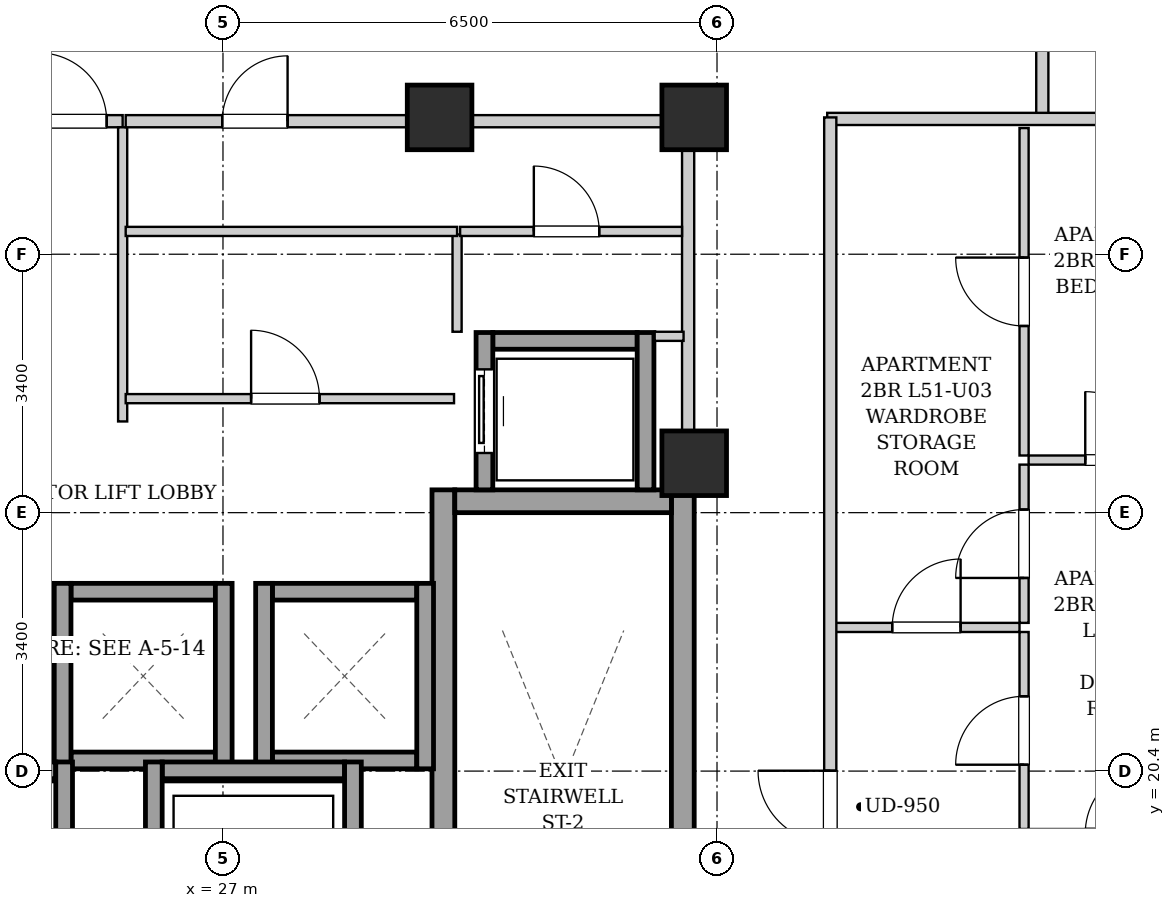
"""IFC4 building model, lengths in metres.
Left out: names, types, materials, properties, quantities, classifications, styles, units other than length and angle.
Written with IfcOpenShell. Run it as: python <this file> out.ifc"""

import sys

from ifc_helpers import new_model, si_unit, direction, frame, frame_2d, origin, origin_2d, place, context, subcontext, project, spatial, rectangle, extrude, element, fill, save


model = new_model("IFC4")
c1 = context("Model", 3, precision=1e-05, world=origin(), true_north=direction((0.0, 1.0)))
c2 = subcontext(c1, "Body", "Model", "MODEL_VIEW")
j1 = project(units=[si_unit("LENGTHUNIT", "METRE"), si_unit("PLANEANGLEUNIT", "RADIAN")], contexts=[c1])
p1 = place(None, origin())
s1 = spatial("IfcSite", under=j1, at=p1, CompositionType="ELEMENT")
p2 = place(p1, origin())
s2 = spatial("IfcBuilding", under=s1, at=p2, CompositionType="ELEMENT")
p3 = place(p2, frame((0.0, 0.0, 177.7)))
s3 = spatial("IfcBuildingStorey", under=s2, at=p3, CompositionType="ELEMENT", Elevation=177.7)
for number, where, z_axis, x_axis in (
    (1, (29.85, 29.0, 0.0), (0.0, 0.0, 1.0), (1.0, 0.0, 0.0)),
    (2, (33.2, 29.0, 0.0), (0.0, 0.0, 1.0), (1.0, 0.0, 0.0)),
    (3, (33.2, 24.45, 0.0), (0.0, 0.0, 1.0), (1.0, 0.0, 0.0)),
):
    element("IfcColumn", number, at=place(p3, frame(where, z_axis=z_axis, x_axis=x_axis)), inside=s3, PredefinedType="COLUMN", context=c2, shape_type="SweptSolid", body=[
        extrude(rectangle(XDim=0.85, YDim=0.85, at=origin_2d()), origin(), (0.0, 0.0, 1.0), 3.3),
    ])
for number, where, z_axis, x_axis in (
    (4, (29.9, 15.1, 0.0), (0.0, 0.0, 1.0), (0.0, 1.0, 0.0)),
    (5, (33.05, 15.1, 0.0), (0.0, 0.0, 1.0), (0.0, 1.0, 0.0)),
):
    element("IfcWall", number, at=place(p3, frame(where, z_axis=z_axis, x_axis=x_axis)), inside=s3, PredefinedType="SHEAR", context=c2, shape_type="SweptSolid", body=[
        extrude(rectangle(XDim=9.0, YDim=0.3, at=frame_2d((4.5, 0.0))), origin(), (0.0, 0.0, 1.0), 3.04),
    ])
p4 = place(p3, frame((30.05, 23.95, 0.0), z_axis=(0.0, 0.0, 1.0), x_axis=(1.0, 0.0, 0.0)))
e6 = element("IfcWall", 6, at=p4, inside=s3, PredefinedType="SHEAR", context=c2, shape_type="SweptSolid", body=[
    extrude(rectangle(XDim=2.85, YDim=0.3, at=frame_2d((1.425, 0.0))), origin(), (0.0, 0.0, 1.0), 3.04),
])
for number, where, z_axis, x_axis in (
    (7, (25.0, 20.54, 0.0), (0.0, 0.0, 1.0), (1.0, 0.0, 0.0)),
    (8, (25.0, 22.76, 0.0), (0.0, 0.0, 1.0), (1.0, 0.0, 0.0)),
):
    element("IfcWall", number, at=place(p3, frame(where, z_axis=z_axis, x_axis=x_axis)), inside=s3, PredefinedType="SHEAR", context=c2, shape_type="SweptSolid", body=[
        extrude(rectangle(XDim=1.9, YDim=0.22, at=frame_2d((0.95, 0.0))), origin(), (0.0, 0.0, 1.0), 3.04),
    ])
for number, where, z_axis, x_axis in (
    (9, (24.89, 20.43, 0.0), (0.0, 0.0, 1.0), (0.0, 1.0, 0.0)),
    (10, (27.01, 20.43, 0.0), (0.0, 0.0, 1.0), (0.0, 1.0, 0.0)),
):
    element("IfcWall", number, at=place(p3, frame(where, z_axis=z_axis, x_axis=x_axis)), inside=s3, PredefinedType="SHEAR", context=c2, shape_type="SweptSolid", body=[
        extrude(rectangle(XDim=2.44, YDim=0.22, at=frame_2d((1.22, 0.0))), origin(), (0.0, 0.0, 1.0), 3.04),
    ])
for number, where, z_axis, x_axis in (
    (11, (27.65, 20.54, 0.0), (0.0, 0.0, 1.0), (1.0, 0.0, 0.0)),
    (12, (27.65, 22.76, 0.0), (0.0, 0.0, 1.0), (1.0, 0.0, 0.0)),
):
    element("IfcWall", number, at=place(p3, frame(where, z_axis=z_axis, x_axis=x_axis)), inside=s3, PredefinedType="SHEAR", context=c2, shape_type="SweptSolid", body=[
        extrude(rectangle(XDim=1.9, YDim=0.22, at=frame_2d((0.95, 0.0))), origin(), (0.0, 0.0, 1.0), 3.04),
    ])
for number, where, z_axis, x_axis in (
    (13, (27.54, 20.43, 0.0), (0.0, 0.0, 1.0), (0.0, 1.0, 0.0)),
    (14, (29.66, 20.43, 0.0), (0.0, 0.0, 1.0), (0.0, 1.0, 0.0)),
):
    element("IfcWall", number, at=place(p3, frame(where, z_axis=z_axis, x_axis=x_axis)), inside=s3, PredefinedType="SHEAR", context=c2, shape_type="SweptSolid", body=[
        extrude(rectangle(XDim=2.44, YDim=0.22, at=frame_2d((1.22, 0.0))), origin(), (0.0, 0.0, 1.0), 3.04),
    ])
p5 = place(p3, frame((30.55, 26.06, 0.0), z_axis=(0.0, 0.0, 1.0), x_axis=(1.0, 0.0, 0.0)))
e15 = element("IfcWall", 15, at=p5, inside=s3, PredefinedType="SHEAR", context=c2, shape_type="SweptSolid", body=[
    extrude(rectangle(XDim=1.9, YDim=0.22, at=frame_2d((0.95, 0.0))), origin(), (0.0, 0.0, 1.0), 3.04),
])
p6 = place(p3, frame((30.44, 24.1, 0.0), z_axis=(0.0, 0.0, 1.0), x_axis=(0.0, 1.0, 0.0)))
e16 = element("IfcWall", 16, at=p6, inside=s3, PredefinedType="SHEAR", context=c2, shape_type="SweptSolid", body=[
    extrude(rectangle(XDim=2.07, YDim=0.22, at=frame_2d((1.035, 0.0))), origin(), (0.0, 0.0, 1.0), 3.04),
])
p7 = place(p6, frame((0.485, 0.0, 0.0)))
e17 = element("IfcOpeningElement", 17, at=p7, cuts=e16, PredefinedType="OPENING", context=c2, shape_type="SweptSolid", body=[
    extrude(rectangle(XDim=1.1, YDim=2.15, at=frame_2d((0.55, 1.075))), frame((0.0, 0.12, 0.0), z_axis=(0.0, -1.0, 0.0), x_axis=(1.0, 0.0, 0.0)), (0.0, 0.0, 1.0), 0.24),
])
p8 = place(p3, frame((32.56, 24.1, 0.0), z_axis=(0.0, 0.0, 1.0), x_axis=(0.0, 1.0, 0.0)))
e18 = element("IfcWall", 18, at=p8, inside=s3, PredefinedType="SHEAR", context=c2, shape_type="SweptSolid", body=[
    extrude(rectangle(XDim=2.07, YDim=0.22, at=frame_2d((1.035, 0.0))), origin(), (0.0, 0.0, 1.0), 3.04),
])
p9 = place(p3, frame((22.4, 20.41, 0.0), z_axis=(0.0, 0.0, 1.0), x_axis=(1.0, 0.0, 0.0)))
e19 = element("IfcWall", 19, at=p9, inside=s3, PredefinedType="SHEAR", context=c2, shape_type="SweptSolid", body=[
    extrude(rectangle(XDim=2.4, YDim=0.22, at=frame_2d((1.2, 0.0))), origin(), (0.0, 0.0, 1.0), 3.04),
])
p10 = place(p3, frame((24.91, 17.98, 0.0), z_axis=(0.0, 0.0, 1.0), x_axis=(0.0, 1.0, 0.0)))
e20 = element("IfcWall", 20, at=p10, inside=s3, PredefinedType="SHEAR", context=c2, shape_type="SweptSolid", body=[
    extrude(rectangle(XDim=2.54, YDim=0.22, at=frame_2d((1.27, 0.0))), origin(), (0.0, 0.0, 1.0), 3.04),
])
p11 = place(p3, frame((26.2, 20.41, 0.0), z_axis=(0.0, 0.0, 1.0), x_axis=(1.0, 0.0, 0.0)))
e21 = element("IfcWall", 21, at=p11, inside=s3, PredefinedType="SHEAR", context=c2, shape_type="SweptSolid", body=[
    extrude(rectangle(XDim=2.4, YDim=0.22, at=frame_2d((1.2, 0.0))), origin(), (0.0, 0.0, 1.0), 3.04),
])
for number, where, z_axis, x_axis in (
    (22, (26.09, 17.98, 0.0), (0.0, 0.0, 1.0), (0.0, 1.0, 0.0)),
    (23, (28.71, 17.98, 0.0), (0.0, 0.0, 1.0), (0.0, 1.0, 0.0)),
):
    element("IfcWall", number, at=place(p3, frame(where, z_axis=z_axis, x_axis=x_axis)), inside=s3, PredefinedType="SHEAR", context=c2, shape_type="SweptSolid", body=[
        extrude(rectangle(XDim=2.54, YDim=0.22, at=frame_2d((1.27, 0.0))), origin(), (0.0, 0.0, 1.0), 3.04),
    ])
p12 = place(p3, frame((33.12, 24.12, 0.0), z_axis=(0.0, 0.0, 1.0), x_axis=(0.0, 1.0, 0.0)))
e24 = element("IfcWall", 24, at=p12, inside=s3, PredefinedType="PARTITIONING", context=c2, shape_type="SweptSolid", body=[
    extrude(rectangle(XDim=4.76, YDim=0.16, at=frame_2d((2.38, 0.0))), origin(), (0.0, 0.0, 1.0), 2.375),
])
p13 = place(p3, frame((24.36, 28.95, 0.0), z_axis=(0.0, 0.0, 1.0), x_axis=(1.0, 0.0, 0.0)))
e25 = element("IfcWall", 25, at=p13, inside=s3, PredefinedType="PARTITIONING", context=c2, shape_type="SweptSolid", body=[
    extrude(rectangle(XDim=1.32, YDim=0.16, at=frame_2d((0.66, 0.0))), origin(), (0.0, 0.0, 1.0), 2.556),
])
p14 = place(p13, frame((0.21, 0.0, 0.0)))
e26 = element("IfcOpeningElement", 26, at=p14, cuts=e25, PredefinedType="OPENING", context=c2, shape_type="SweptSolid", body=[
    extrude(rectangle(XDim=0.9, YDim=2.05, at=frame_2d((0.45, 1.025))), frame((0.0, 0.09, 0.0), z_axis=(0.0, -1.0, 0.0), x_axis=(1.0, 0.0, 0.0)), (0.0, 0.0, 1.0), 0.18),
])
p15 = place(p3, frame((25.68, 25.0, 0.0), z_axis=(0.0, 0.0, 1.0), x_axis=(0.0, 1.0, 0.0)))
e27 = element("IfcWall", 27, at=p15, inside=s3, PredefinedType="PARTITIONING", context=c2, shape_type="SweptSolid", body=[
    extrude(rectangle(XDim=3.87, YDim=0.12, at=frame_2d((1.935, 0.0))), origin(), (0.0, 0.0, 1.0), 3.04),
])
p16 = place(p3, frame((30.08, 26.18, 0.0), z_axis=(0.0, 0.0, 1.0), x_axis=(0.0, 1.0, 0.0)))
e28 = element("IfcWall", 28, at=p16, inside=s3, PredefinedType="PARTITIONING", context=c2, shape_type="SweptSolid", body=[
    extrude(rectangle(XDim=1.28, YDim=0.12, at=frame_2d((0.64, 0.0))), origin(), (0.0, 0.0, 1.0), 3.04),
])
p17 = place(p3, frame((32.68, 26.12, 0.0), z_axis=(0.0, 0.0, 1.0), x_axis=(1.0, 0.0, 0.0)))
e29 = element("IfcWall", 29, at=p17, inside=s3, PredefinedType="PARTITIONING", context=c2, shape_type="SweptSolid", body=[
    extrude(rectangle(XDim=0.38, YDim=0.12, at=frame_2d((0.19, 0.0))), origin(), (0.0, 0.0, 1.0), 3.04),
])
p18 = place(p3, frame((30.12, 27.5, 0.0), z_axis=(0.0, 0.0, 1.0), x_axis=(1.0, 0.0, 0.0)))
e30 = element("IfcWall", 30, at=p18, inside=s3, PredefinedType="PARTITIONING", context=c2, shape_type="SweptSolid", body=[
    extrude(rectangle(XDim=2.92, YDim=0.12, at=frame_2d((1.46, 0.0))), origin(), (0.0, 0.0, 1.0), 3.04),
])
p19 = place(p18, frame((0.97, 0.0, 0.0)))
e31 = element("IfcOpeningElement", 31, at=p19, cuts=e30, PredefinedType="OPENING", context=c2, shape_type="SweptSolid", body=[
    extrude(rectangle(XDim=0.86, YDim=2.05, at=frame_2d((0.43, 1.025))), frame((0.0, 0.07, 0.0), z_axis=(0.0, -1.0, 0.0), x_axis=(1.0, 0.0, 0.0)), (0.0, 0.0, 1.0), 0.14),
])
p20 = place(p3, frame((25.72, 27.5, 0.0), z_axis=(0.0, 0.0, 1.0), x_axis=(1.0, 0.0, 0.0)))
e32 = element("IfcWall", 32, at=p20, inside=s3, PredefinedType="PARTITIONING", context=c2, shape_type="SweptSolid", body=[
    extrude(rectangle(XDim=4.36, YDim=0.12, at=frame_2d((2.18, 0.0))), origin(), (0.0, 0.0, 1.0), 3.04),
])
p21 = place(p3, frame((25.72, 25.3, 0.0), z_axis=(0.0, 0.0, 1.0), x_axis=(1.0, 0.0, 0.0)))
e33 = element("IfcWall", 33, at=p21, inside=s3, PredefinedType="PARTITIONING", context=c2, shape_type="SweptSolid", body=[
    extrude(rectangle(XDim=4.32, YDim=0.12, at=frame_2d((2.16, 0.0))), origin(), (0.0, 0.0, 1.0), 3.04),
])
p22 = place(p21, frame((1.65, 0.0, 0.0)))
e34 = element("IfcOpeningElement", 34, at=p22, cuts=e33, PredefinedType="OPENING", context=c2, shape_type="SweptSolid", body=[
    extrude(rectangle(XDim=0.9, YDim=2.05, at=frame_2d((0.45, 1.025))), frame((0.0, 0.07, 0.0), z_axis=(0.0, -1.0, 0.0), x_axis=(1.0, 0.0, 0.0)), (0.0, 0.0, 1.0), 0.14),
])
p23 = place(p3, frame((25.72, 28.95, 0.0), z_axis=(0.0, 0.0, 1.0), x_axis=(1.0, 0.0, 0.0)))
e35 = element("IfcWall", 35, at=p23, inside=s3, PredefinedType="PARTITIONING", context=c2, shape_type="SweptSolid", body=[
    extrude(rectangle(XDim=7.32, YDim=0.16, at=frame_2d((3.66, 0.0))), origin(), (0.0, 0.0, 1.0), 2.556),
])
p24 = place(p23, frame((1.27, 0.0, 0.0)))
e36 = element("IfcOpeningElement", 36, at=p24, cuts=e35, PredefinedType="OPENING", context=c2, shape_type="SweptSolid", body=[
    extrude(rectangle(XDim=0.86, YDim=2.05, at=frame_2d((0.43, 1.025))), frame((0.0, 0.09, 0.0), z_axis=(0.0, -1.0, 0.0), x_axis=(1.0, 0.0, 0.0)), (0.0, 0.0, 1.0), 0.18),
])
p25 = place(p3, frame((37.78, 28.98, 0.0), z_axis=(0.0, 0.0, 1.0), x_axis=(0.0, 1.0, 0.0)))
e37 = element("IfcWall", 37, at=p25, inside=s3, PredefinedType="PARTITIONING", context=c2, shape_type="SweptSolid", body=[
    extrude(rectangle(XDim=1.58, YDim=0.16, at=frame_2d((0.79, 0.0))), origin(), (0.0, 0.0, 1.0), 3.04),
])
p26 = place(p3, frame((34.95, 28.98, 0.0), z_axis=(0.0, 0.0, 1.0), x_axis=(1.0, 0.0, 0.0)))
e38 = element("IfcWall", 38, at=p26, inside=s3, PredefinedType="PARTITIONING", context=c2, shape_type="SweptSolid", body=[
    extrude(rectangle(XDim=5.07, YDim=0.16, at=frame_2d((2.535, 0.0))), origin(), (0.0, 0.0, 1.0), 2.556),
])
p27 = place(p3, frame((35.03, 22.29, 0.0), z_axis=(0.0, 0.0, 1.0), x_axis=(1.0, 0.0, 0.0)))
e39 = element("IfcWall", 39, at=p27, inside=s3, PredefinedType="PARTITIONING", context=c2, shape_type="SweptSolid", body=[
    extrude(rectangle(XDim=2.45, YDim=0.12, at=frame_2d((1.225, 0.0))), origin(), (0.0, 0.0, 1.0), 3.04),
])
p28 = place(p27, frame((0.775, 0.0, 0.0)))
e40 = element("IfcOpeningElement", 40, at=p28, cuts=e39, PredefinedType="OPENING", context=c2, shape_type="SweptSolid", body=[
    extrude(rectangle(XDim=0.9, YDim=2.05, at=frame_2d((0.45, 1.025))), frame((0.0, 0.07, 0.0), z_axis=(0.0, -1.0, 0.0), x_axis=(1.0, 0.0, 0.0)), (0.0, 0.0, 1.0), 0.14),
])
p29 = place(p3, frame((37.54, 22.35, 0.0), z_axis=(0.0, 0.0, 1.0), x_axis=(0.0, 1.0, 0.0)))
e41 = element("IfcWall", 41, at=p29, inside=s3, PredefinedType="PARTITIONING", context=c2, shape_type="SweptSolid", body=[
    extrude(rectangle(XDim=2.082, YDim=0.12, at=frame_2d((1.041, 0.0))), origin(), (0.0, 0.0, 1.0), 3.04),
])
p30 = place(p29, frame((0.591, 0.0, 0.0)))
e42 = element("IfcOpeningElement", 42, at=p30, cuts=e41, PredefinedType="OPENING", context=c2, shape_type="SweptSolid", body=[
    extrude(rectangle(XDim=0.9, YDim=2.05, at=frame_2d((0.45, 1.025))), frame((0.0, 0.07, 0.0), z_axis=(0.0, -1.0, 0.0), x_axis=(1.0, 0.0, 0.0)), (0.0, 0.0, 1.0), 0.14),
])
p31 = place(p3, frame((37.54, 24.552, 0.0), z_axis=(0.0, 0.0, 1.0), x_axis=(0.0, 1.0, 0.0)))
e43 = element("IfcWall", 43, at=p31, inside=s3, PredefinedType="PARTITIONING", context=c2, shape_type="SweptSolid", body=[
    extrude(rectangle(XDim=4.308, YDim=0.12, at=frame_2d((2.154, 0.0))), origin(), (0.0, 0.0, 1.0), 3.04),
])
p32 = place(p31, frame((1.704, 0.0, 0.0)))
e44 = element("IfcOpeningElement", 44, at=p32, cuts=e43, PredefinedType="OPENING", context=c2, shape_type="SweptSolid", body=[
    extrude(rectangle(XDim=0.9, YDim=2.05, at=frame_2d((0.45, 1.025))), frame((0.0, 0.07, 0.0), z_axis=(0.0, -1.0, 0.0), x_axis=(1.0, 0.0, 0.0)), (0.0, 0.0, 1.0), 0.14),
])
p33 = place(p3, frame((37.54, 19.638, 0.0), z_axis=(0.0, 0.0, 1.0), x_axis=(0.0, 1.0, 0.0)))
e45 = element("IfcWall", 45, at=p33, inside=s3, PredefinedType="PARTITIONING", context=c2, shape_type="SweptSolid", body=[
    extrude(rectangle(XDim=2.592, YDim=0.12, at=frame_2d((1.296, 0.0))), origin(), (0.0, 0.0, 1.0), 3.04),
])
p34 = place(p33, frame((0.846, 0.0, 0.0)))
e46 = element("IfcOpeningElement", 46, at=p34, cuts=e45, PredefinedType="OPENING", context=c2, shape_type="SweptSolid", body=[
    extrude(rectangle(XDim=0.9, YDim=2.05, at=frame_2d((0.45, 1.025))), frame((0.0, 0.07, 0.0), z_axis=(0.0, -1.0, 0.0), x_axis=(1.0, 0.0, 0.0)), (0.0, 0.0, 1.0), 0.14),
])
p35 = place(p3, frame((37.6, 24.492, 0.0), z_axis=(0.0, 0.0, 1.0), x_axis=(1.0, 0.0, 0.0)))
e47 = element("IfcWall", 47, at=p35, inside=s3, PredefinedType="PARTITIONING", context=c2, shape_type="SweptSolid", body=[
    extrude(rectangle(XDim=2.42, YDim=0.12, at=frame_2d((1.21, 0.0))), origin(), (0.0, 0.0, 1.0), 2.722),
])
p36 = place(p35, frame((0.745, 0.0, 0.0)))
e48 = element("IfcOpeningElement", 48, at=p36, cuts=e47, PredefinedType="OPENING", context=c2, shape_type="SweptSolid", body=[
    extrude(rectangle(XDim=0.9, YDim=2.05, at=frame_2d((0.45, 1.025))), frame((0.0, 0.07, 0.0), z_axis=(0.0, -1.0, 0.0), x_axis=(1.0, 0.0, 0.0)), (0.0, 0.0, 1.0), 0.14),
])
p37 = place(p3, frame((34.99, 15.07, 0.0), z_axis=(0.0, 0.0, 1.0), x_axis=(0.0, 1.0, 0.0)))
e49 = element("IfcWall", 49, at=p37, inside=s3, PredefinedType="PARTITIONING", context=c2, shape_type="SweptSolid", body=[
    extrude(rectangle(XDim=13.93, YDim=0.16, at=frame_2d((6.965, 0.0))), origin(), (0.0, 0.0, 1.0), 3.04),
])
p38 = place(p37, frame((4.385, 0.0, 0.0)))
e50 = element("IfcOpeningElement", 50, at=p38, cuts=e49, PredefinedType="OPENING", context=c2, shape_type="SweptSolid", body=[
    extrude(rectangle(XDim=0.95, YDim=2.1, at=frame_2d((0.475, 1.05))), frame((0.0, 0.09, 0.0), z_axis=(0.0, -1.0, 0.0), x_axis=(1.0, 0.0, 0.0)), (0.0, 0.0, 1.0), 0.18),
])
p39 = place(p7, origin())
e51 = element("IfcDoor", 51, at=p39, inside=s3, OperationType="SLIDING_TO_LEFT", PredefinedType="DOOR", context=c2, shape_type="SweptSolid", body=[
    extrude(rectangle(XDim=1.1, YDim=2.15, at=frame_2d((0.55, 1.075))), frame((0.0, 0.025, 0.0), z_axis=(0.0, -1.0, 0.0), x_axis=(1.0, 0.0, 0.0)), (0.0, 0.0, 1.0), 0.05),
])
fill(e17, e51)
p40 = place(p14, origin())
e52 = element("IfcDoor", 52, at=p40, inside=s3, OperationType="SINGLE_SWING_LEFT", PredefinedType="DOOR", context=c2, shape_type="SweptSolid", body=[
    extrude(rectangle(XDim=0.9, YDim=2.05, at=frame_2d((0.45, 1.025))), frame((0.0, 0.025, 0.0), z_axis=(0.0, -1.0, 0.0), x_axis=(1.0, 0.0, 0.0)), (0.0, 0.0, 1.0), 0.05),
])
fill(e26, e52)
p41 = place(p19, origin())
e53 = element("IfcDoor", 53, at=p41, inside=s3, OperationType="SINGLE_SWING_LEFT", PredefinedType="DOOR", context=c2, shape_type="SweptSolid", body=[
    extrude(rectangle(XDim=0.86, YDim=2.05, at=frame_2d((0.43, 1.025))), frame((0.0, 0.025, 0.0), z_axis=(0.0, -1.0, 0.0), x_axis=(1.0, 0.0, 0.0)), (0.0, 0.0, 1.0), 0.05),
])
fill(e31, e53)
p42 = place(p22, origin())
e54 = element("IfcDoor", 54, at=p42, inside=s3, OperationType="SINGLE_SWING_LEFT", PredefinedType="DOOR", context=c2, shape_type="SweptSolid", body=[
    extrude(rectangle(XDim=0.9, YDim=2.05, at=frame_2d((0.45, 1.025))), frame((0.0, 0.025, 0.0), z_axis=(0.0, -1.0, 0.0), x_axis=(1.0, 0.0, 0.0)), (0.0, 0.0, 1.0), 0.05),
])
fill(e34, e54)
p43 = place(p24, origin())
e55 = element("IfcDoor", 55, at=p43, inside=s3, OperationType="SINGLE_SWING_RIGHT", PredefinedType="DOOR", context=c2, shape_type="SweptSolid", body=[
    extrude(rectangle(XDim=0.86, YDim=2.05, at=frame_2d((0.43, 1.025))), frame((0.0, 0.025, 0.0), z_axis=(0.0, -1.0, 0.0), x_axis=(1.0, 0.0, 0.0)), (0.0, 0.0, 1.0), 0.05),
])
fill(e36, e55)
p44 = place(p28, origin())
e56 = element("IfcDoor", 56, at=p44, inside=s3, OperationType="SINGLE_SWING_RIGHT", PredefinedType="DOOR", context=c2, shape_type="SweptSolid", body=[
    extrude(rectangle(XDim=0.9, YDim=2.05, at=frame_2d((0.45, 1.025))), frame((0.0, 0.025, 0.0), z_axis=(0.0, -1.0, 0.0), x_axis=(1.0, 0.0, 0.0)), (0.0, 0.0, 1.0), 0.05),
])
fill(e40, e56)
p45 = place(p30, origin())
e57 = element("IfcDoor", 57, at=p45, inside=s3, OperationType="SINGLE_SWING_LEFT", PredefinedType="DOOR", context=c2, shape_type="SweptSolid", body=[
    extrude(rectangle(XDim=0.9, YDim=2.05, at=frame_2d((0.45, 1.025))), frame((0.0, 0.025, 0.0), z_axis=(0.0, -1.0, 0.0), x_axis=(1.0, 0.0, 0.0)), (0.0, 0.0, 1.0), 0.05),
])
fill(e42, e57)
p46 = place(p32, origin())
e58 = element("IfcDoor", 58, at=p46, inside=s3, OperationType="SINGLE_SWING_RIGHT", PredefinedType="DOOR", context=c2, shape_type="SweptSolid", body=[
    extrude(rectangle(XDim=0.9, YDim=2.05, at=frame_2d((0.45, 1.025))), frame((0.0, 0.025, 0.0), z_axis=(0.0, -1.0, 0.0), x_axis=(1.0, 0.0, 0.0)), (0.0, 0.0, 1.0), 0.05),
])
fill(e44, e58)
p47 = place(p34, origin())
e59 = element("IfcDoor", 59, at=p47, inside=s3, OperationType="SINGLE_SWING_LEFT", PredefinedType="DOOR", context=c2, shape_type="SweptSolid", body=[
    extrude(rectangle(XDim=0.9, YDim=2.05, at=frame_2d((0.45, 1.025))), frame((0.0, 0.025, 0.0), z_axis=(0.0, -1.0, 0.0), x_axis=(1.0, 0.0, 0.0)), (0.0, 0.0, 1.0), 0.05),
])
fill(e46, e59)
p48 = place(p36, origin())
e60 = element("IfcDoor", 60, at=p48, inside=s3, OperationType="SINGLE_SWING_LEFT", PredefinedType="DOOR", context=c2, shape_type="SweptSolid", body=[
    extrude(rectangle(XDim=0.9, YDim=2.05, at=frame_2d((0.45, 1.025))), frame((0.0, 0.025, 0.0), z_axis=(0.0, -1.0, 0.0), x_axis=(1.0, 0.0, 0.0)), (0.0, 0.0, 1.0), 0.05),
])
fill(e48, e60)
p49 = place(p38, origin())
e61 = element("IfcDoor", 61, at=p49, inside=s3, OperationType="SINGLE_SWING_RIGHT", PredefinedType="DOOR", context=c2, shape_type="SweptSolid", body=[
    extrude(rectangle(XDim=0.95, YDim=2.1, at=frame_2d((0.475, 1.05))), frame((0.0, 0.025, 0.0), z_axis=(0.0, -1.0, 0.0), x_axis=(1.0, 0.0, 0.0)), (0.0, 0.0, 1.0), 0.05),
])
fill(e50, e61)
save(model, sys.argv[1])
